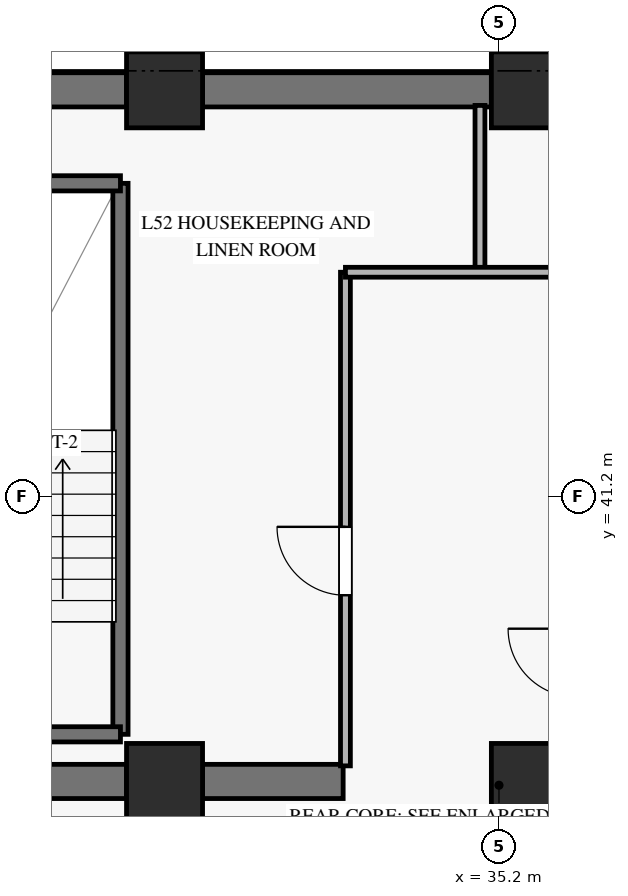
"""IFC4 building model, lengths in metres.
Left out: names, types, materials, properties, quantities, classifications, styles, units other than length and angle.
Written with IfcOpenShell. Run it as: python <this file> out.ifc"""

import sys

from ifc_helpers import new_model, si_unit, direction, frame, frame_2d, origin, origin_2d, place, context, subcontext, project, spatial, rectangle, extrude, source, transform, mapped, element, fill, save


model = new_model("IFC4")
c1 = context("Model", 3, precision=1e-05, world=origin(), true_north=direction((0.0, 1.0)))
c2 = subcontext(c1, "Body", "Model", "MODEL_VIEW")
j1 = project(units=[si_unit("LENGTHUNIT", "METRE"), si_unit("PLANEANGLEUNIT", "RADIAN")], contexts=[c1])
p1 = place(None, origin())
s1 = spatial("IfcSite", under=j1, at=p1, CompositionType="ELEMENT")
p2 = place(p1, origin())
s2 = spatial("IfcBuilding", under=s1, at=p2, CompositionType="ELEMENT")
p3 = place(p2, frame((0.0, 0.0, 206.2)))
s3 = spatial("IfcBuildingStorey", under=s2, at=p3, CompositionType="ELEMENT", Elevation=206.2)
m1 = source(origin(), c2, "Body", "SweptSolid", [
    extrude(rectangle(XDim=1.0, YDim=1.0, at=origin_2d()), origin(), (0.0, 0.0, 1.0), 3.27),
])
for number, where, z_axis, x_axis in (
    (1, (30.8, 37.45, 0.0), (0.0, 0.0, 1.0), (1.0, 0.0, 0.0)),
    (2, (30.8, 46.55, 0.0), (0.0, 0.0, 1.0), (1.0, 0.0, 0.0)),
    (3, (35.6, 37.45, 0.0), (0.0, 0.0, 1.0), (1.0, 0.0, 0.0)),
    (4, (35.6, 46.55, 0.0), (0.0, 0.0, 1.0), (1.0, 0.0, 0.0)),
):
    element("IfcColumn", number, at=place(p3, frame(where, z_axis=z_axis, x_axis=x_axis)), inside=s3, PredefinedType="PILASTER", context=c2, shape_type="MappedRepresentation", body=[
        mapped(m1, transform((0.0, 0.0, 0.0), x_axis=(1.0, 0.0, 0.0), y_axis=(0.0, 1.0, 0.0), z_axis=(0.0, 0.0, 1.0), scale=1.0)),
    ])
p4 = place(p3, frame((20.35, 46.55, 0.0), z_axis=(0.0, 0.0, 1.0), x_axis=(1.0, 0.0, 0.0)))
e5 = element("IfcWall", 5, at=p4, inside=s3, PredefinedType="SHEAR", context=c2, shape_type="SweptSolid", body=[
    extrude(rectangle(XDim=9.95, YDim=0.45, at=frame_2d((4.975, 0.0))), origin(), (0.0, 0.0, 1.0), 3.27),
])
p5 = place(p3, frame((31.3, 46.55, 0.0), z_axis=(0.0, 0.0, 1.0), x_axis=(1.0, 0.0, 0.0)))
e6 = element("IfcWall", 6, at=p5, inside=s3, PredefinedType="SHEAR", context=c2, shape_type="SweptSolid", body=[
    extrude(rectangle(XDim=3.8, YDim=0.45, at=frame_2d((1.9, 0.0))), origin(), (0.0, 0.0, 1.0), 3.27),
])
p6 = place(p3, frame((20.35, 37.45, 0.0), z_axis=(0.0, 0.0, 1.0), x_axis=(1.0, 0.0, 0.0)))
e7 = element("IfcWall", 7, at=p6, inside=s3, PredefinedType="SHEAR", context=c2, shape_type="SweptSolid", body=[
    extrude(rectangle(XDim=9.95, YDim=0.45, at=frame_2d((4.975, 0.0))), origin(), (0.0, 0.0, 1.0), 3.27),
])
p7 = place(p6, frame((4.2, 0.0, 0.0)))
e8 = element("IfcOpeningElement", 8, at=p7, cuts=e7, PredefinedType="OPENING", context=c2, shape_type="SweptSolid", body=[
    extrude(rectangle(XDim=1.2, YDim=2.15, at=frame_2d((0.6, 1.075))), frame((0.0, 0.235, 0.0), z_axis=(0.0, -1.0, 0.0), x_axis=(1.0, 0.0, 0.0)), (0.0, 0.0, 1.0), 0.47),
])
p8 = place(p3, frame((31.3, 37.45, 0.0), z_axis=(0.0, 0.0, 1.0), x_axis=(1.0, 0.0, 0.0)))
e9 = element("IfcWall", 9, at=p8, inside=s3, PredefinedType="SHEAR", context=c2, shape_type="SweptSolid", body=[
    extrude(rectangle(XDim=1.85, YDim=0.45, at=frame_2d((0.925, 0.0))), origin(), (0.0, 0.0, 1.0), 3.27),
])
p9 = place(p3, frame((30.22, 38.07, 0.0), z_axis=(0.0, 0.0, 1.0), x_axis=(0.0, 1.0, 0.0)))
e10 = element("IfcWall", 10, at=p9, inside=s3, PredefinedType="SOLIDWALL", context=c2, shape_type="SweptSolid", body=[
    extrude(rectangle(XDim=7.25, YDim=0.2, at=frame_2d((3.625, 0.0))), origin(), (0.0, 0.0, 1.0), 3.5),
])
for number, where, z_axis, x_axis in (
    (11, (27.14, 45.32, 0.0), (0.0, 0.0, 1.0), (1.0, 0.0, 0.0)),
    (12, (27.14, 38.07, 0.0), (0.0, 0.0, 1.0), (1.0, 0.0, 0.0)),
):
    element("IfcWall", number, at=place(p3, frame(where, z_axis=z_axis, x_axis=x_axis)), inside=s3, PredefinedType="SOLIDWALL", context=c2, shape_type="SweptSolid", body=[
        extrude(rectangle(XDim=3.08, YDim=0.2, at=frame_2d((1.54, 0.0))), origin(), (0.0, 0.0, 1.0), 3.5),
    ])
p10 = place(p3, frame((33.18, 37.655, 0.0), z_axis=(0.0, 0.0, 1.0), x_axis=(0.0, 1.0, 0.0)))
e13 = element("IfcWall", 13, at=p10, inside=s3, PredefinedType="PARTITIONING", context=c2, shape_type="SweptSolid", body=[
    extrude(rectangle(XDim=6.495, YDim=0.13, at=frame_2d((3.248, 0.0))), origin(), (0.0, 0.0, 1.0), 2.355),
])
p11 = place(p10, frame((2.245, 0.0, 0.0)))
e14 = element("IfcOpeningElement", 14, at=p11, cuts=e13, PredefinedType="OPENING", context=c2, shape_type="SweptSolid", body=[
    extrude(rectangle(XDim=0.9, YDim=2.1, at=frame_2d((0.45, 1.05))), frame((0.0, 0.075, 0.0), z_axis=(0.0, -1.0, 0.0), x_axis=(1.0, 0.0, 0.0)), (0.0, 0.0, 1.0), 0.15),
])
p12 = place(p3, frame((34.95, 44.15, 0.0), z_axis=(0.0, 0.0, 1.0), x_axis=(0.0, 1.0, 0.0)))
e15 = element("IfcWall", 15, at=p12, inside=s3, PredefinedType="PARTITIONING", context=c2, shape_type="SweptSolid", body=[
    extrude(rectangle(XDim=2.195, YDim=0.13, at=frame_2d((1.098, 0.0))), origin(), (0.0, 0.0, 1.0), 3.27),
])
p13 = place(p3, frame((33.18, 44.15, 0.0), z_axis=(0.0, 0.0, 1.0), x_axis=(1.0, 0.0, 0.0)))
e16 = element("IfcWall", 16, at=p13, inside=s3, PredefinedType="PARTITIONING", context=c2, shape_type="SweptSolid", body=[
    extrude(rectangle(XDim=2.97, YDim=0.13, at=frame_2d((1.485, 0.0))), origin(), (0.0, 0.0, 1.0), 2.555),
])
m2 = source(origin(), c2, "Body", "SweptSolid", [
    extrude(rectangle(XDim=0.9, YDim=2.1, at=frame_2d((0.45, 1.05))), frame((0.0, 0.025, 0.0), z_axis=(0.0, -1.0, 0.0), x_axis=(1.0, 0.0, 0.0)), (0.0, 0.0, 1.0), 0.05),
])
p14 = place(p11, origin())
e17 = element("IfcDoor", 17, at=p14, inside=s3, OperationType="SINGLE_SWING_RIGHT", PredefinedType="DOOR", context=c2, shape_type="MappedRepresentation", body=[
    mapped(m2, transform((0.0, 0.0, 0.0), x_axis=(1.0, 0.0, 0.0), y_axis=(0.0, 1.0, 0.0), z_axis=(0.0, 0.0, 1.0), scale=1.0)),
])
fill(e14, e17)
save(model, sys.argv[1])
